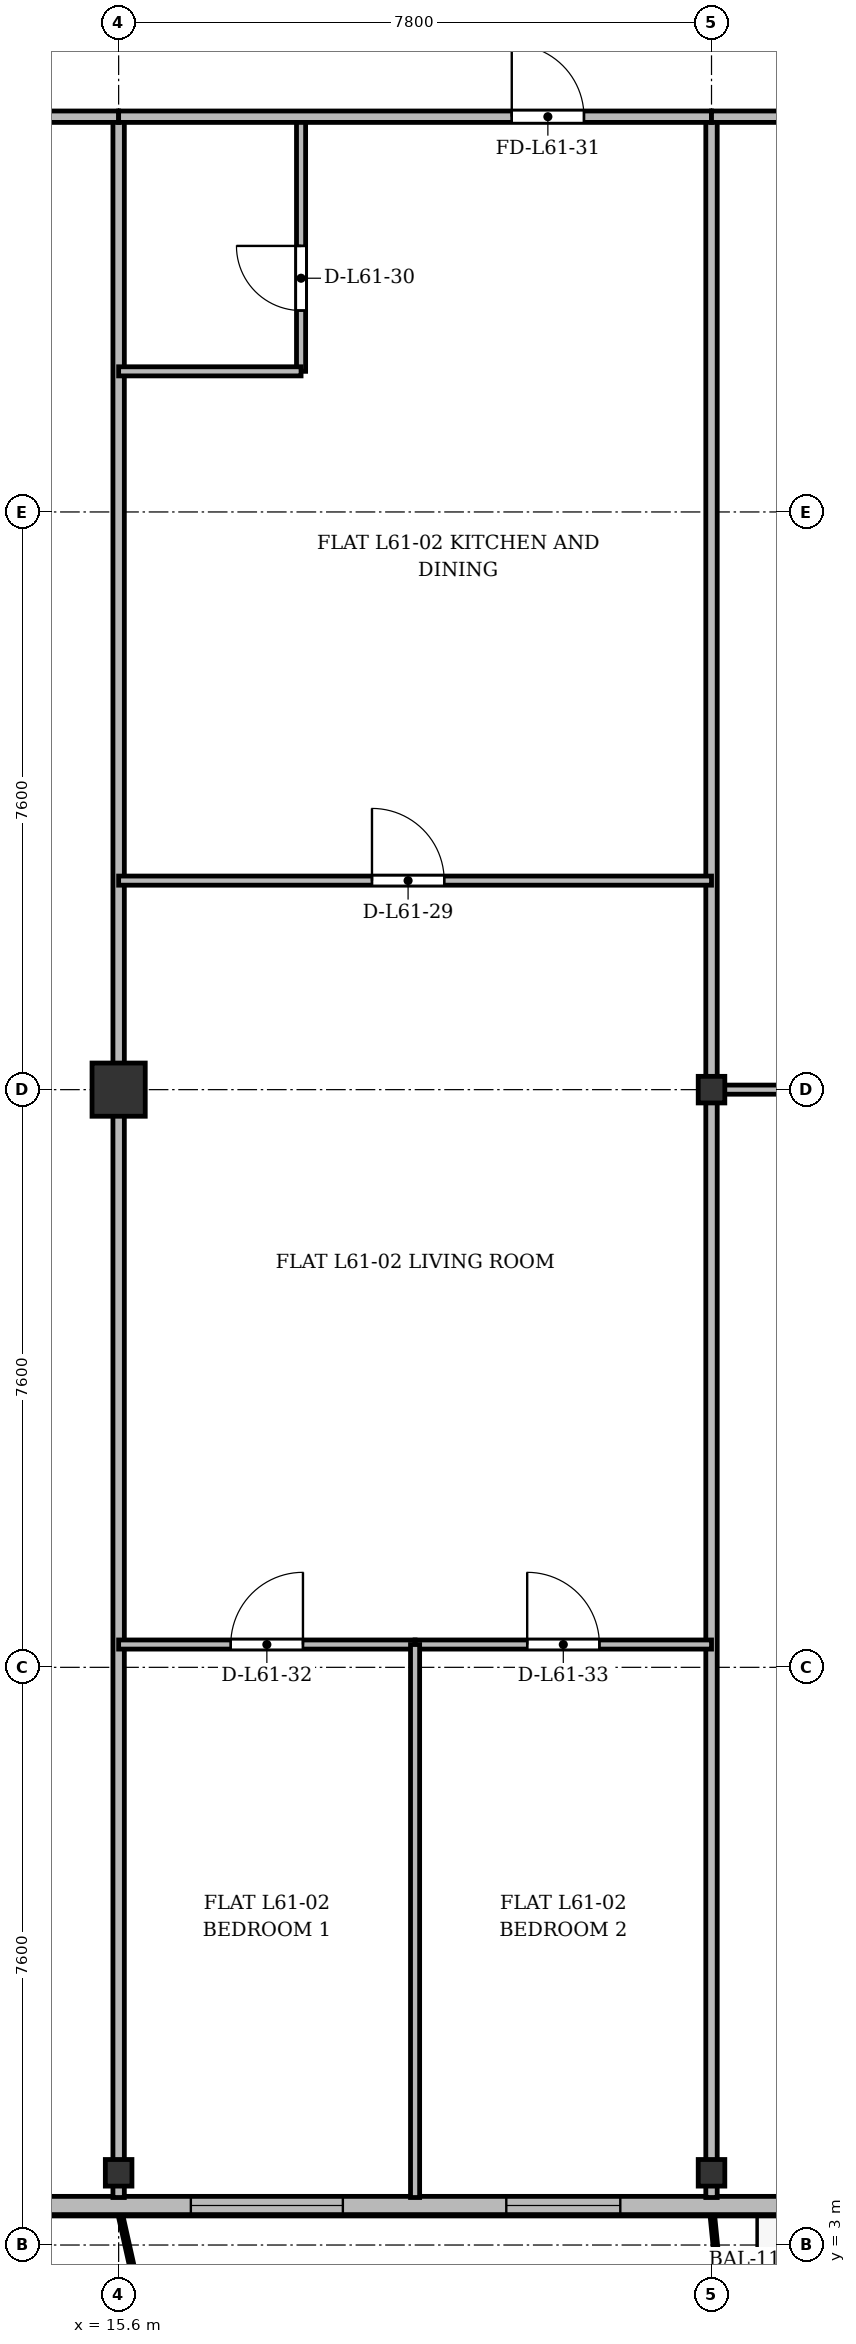
"""IFC4 building model, lengths in metres.
Left out: names, types, materials, properties, quantities, classifications, styles, units other than length and angle.
Written with IfcOpenShell. Run it as: python <this file> out.ifc"""

import sys

from ifc_helpers import new_model, si_unit, direction, frame, frame_2d, origin, origin_2d, place, context, subcontext, project, spatial, rectangle, i_section, extrude, source, transform, mapped, element, fill, save


model = new_model("IFC4")
c1 = context("Model", 3, precision=1e-05, world=origin(), true_north=direction((0.0, 1.0)))
c2 = subcontext(c1, "Body", "Model", "MODEL_VIEW")
j1 = project(units=[si_unit("LENGTHUNIT", "METRE"), si_unit("PLANEANGLEUNIT", "RADIAN")], contexts=[c1])
p1 = place(None, origin())
s1 = spatial("IfcSite", under=j1, at=p1, CompositionType="ELEMENT")
p2 = place(p1, origin())
s2 = spatial("IfcBuilding", under=s1, at=p2, CompositionType="ELEMENT")
p3 = place(p2, frame((0.0, 0.0, 233.7)))
s3 = spatial("IfcBuildingStorey", under=s2, at=p3, CompositionType="ELEMENT", Elevation=233.7)
m1 = source(origin(), c2, "Body", "SweptSolid", [
    extrude(i_section(OverallWidth=0.35, OverallDepth=0.35, WebThickness=0.018, FlangeThickness=0.028, at=origin_2d()), origin(), (0.0, 0.0, 1.0), 3.6),
])
p4 = place(p3, frame((15.6, 3.95, 0.0), z_axis=(0.0, 0.0, 1.0), x_axis=(1.0, 0.0, 0.0)))
e1 = element("IfcColumn", 1, at=p4, inside=s3, PredefinedType="COLUMN", context=c2, shape_type="MappedRepresentation", body=[
    mapped(m1, transform((0.0, 0.0, 0.0), x_axis=(1.0, 0.0, 0.0), y_axis=(0.0, 1.0, 0.0), z_axis=(0.0, 0.0, 1.0), scale=1.0)),
])
m2 = source(origin(), c2, "Body", "SweptSolid", [
    extrude(rectangle(XDim=0.7, YDim=0.7, at=origin_2d()), origin(), (0.0, 0.0, 1.0), 3.6),
])
p5 = place(p3, frame((15.6, 18.2, 0.0), z_axis=(0.0, 0.0, 1.0), x_axis=(1.0, 0.0, 0.0)))
e2 = element("IfcColumn", 2, at=p5, inside=s3, PredefinedType="COLUMN", context=c2, shape_type="MappedRepresentation", body=[
    mapped(m2, transform((0.0, 0.0, 0.0), x_axis=(1.0, 0.0, 0.0), y_axis=(0.0, 1.0, 0.0), z_axis=(0.0, 0.0, 1.0), scale=1.0)),
])
for number, where, z_axis, x_axis in (
    (3, (23.4, 3.95, 0.0), (0.0, 0.0, 1.0), (1.0, 0.0, 0.0)),
    (4, (23.4, 18.2, 0.0), (0.0, 0.0, 1.0), (1.0, 0.0, 0.0)),
):
    element("IfcColumn", number, at=place(p3, frame(where, z_axis=z_axis, x_axis=x_axis)), inside=s3, PredefinedType="COLUMN", context=c2, shape_type="MappedRepresentation", body=[
        mapped(m1, transform((0.0, 0.0, 0.0), x_axis=(1.0, 0.0, 0.0), y_axis=(0.0, 1.0, 0.0), z_axis=(0.0, 0.0, 1.0), scale=1.0)),
    ])
p6 = place(p3, frame((44.8, 3.52, 0.0), z_axis=(0.0, 0.0, 1.0), x_axis=(-1.0, 0.0, 0.0)))
e5 = element("IfcWall", 5, at=p6, inside=s3, PredefinedType="SOLIDWALL", context=c2, shape_type="SweptSolid", body=[
    extrude(rectangle(XDim=33.8, YDim=0.24, at=frame_2d((16.9, 0.0))), origin(), (0.0, 0.0, 1.0), 3.36),
])
p7 = place(p6, frame((2.55, 0.0, 0.9)))
e6 = element("IfcOpeningElement", 6, at=p7, cuts=e5, PredefinedType="OPENING", context=c2, shape_type="SweptSolid", body=[
    extrude(rectangle(XDim=1.5, YDim=1.75, at=frame_2d((0.75, 0.875))), frame((0.0, 0.13, 0.0), z_axis=(0.0, -1.0, 0.0), x_axis=(1.0, 0.0, 0.0)), (0.0, 0.0, 1.0), 0.26),
])
p8 = place(p6, frame((6.034, 0.0, 0.9)))
e7 = element("IfcOpeningElement", 7, at=p8, cuts=e5, PredefinedType="OPENING", context=c2, shape_type="SweptSolid", body=[
    extrude(rectangle(XDim=2.0, YDim=1.95, at=frame_2d((1.0, 0.975))), frame((0.0, 0.13, 0.0), z_axis=(0.0, -1.0, 0.0), x_axis=(1.0, 0.0, 0.0)), (0.0, 0.0, 1.0), 0.26),
])
p9 = place(p6, frame((9.075, 0.0, 0.9)))
e8 = element("IfcOpeningElement", 8, at=p9, cuts=e5, PredefinedType="OPENING", context=c2, shape_type="SweptSolid", body=[
    extrude(rectangle(XDim=1.65, YDim=1.85, at=frame_2d((0.825, 0.925))), frame((0.0, 0.13, 0.0), z_axis=(0.0, -1.0, 0.0), x_axis=(1.0, 0.0, 0.0)), (0.0, 0.0, 1.0), 0.26),
])
p10 = place(p6, frame((11.867, 0.0, 0.9)))
e9 = element("IfcOpeningElement", 9, at=p10, cuts=e5, PredefinedType="OPENING", context=c2, shape_type="SweptSolid", body=[
    extrude(rectangle(XDim=1.8, YDim=1.8, at=frame_2d((0.9, 0.9))), frame((0.0, 0.13, 0.0), z_axis=(0.0, -1.0, 0.0), x_axis=(1.0, 0.0, 0.0)), (0.0, 0.0, 1.0), 0.26),
])
p11 = place(p6, frame((17.291, 0.0, 0.0)))
e10 = element("IfcOpeningElement", 10, at=p11, cuts=e5, PredefinedType="OPENING", context=c2, shape_type="SweptSolid", body=[
    extrude(rectangle(XDim=1.2, YDim=2.2, at=frame_2d((0.6, 1.1))), frame((0.0, 0.13, 0.0), z_axis=(0.0, -1.0, 0.0), x_axis=(1.0, 0.0, 0.0)), (0.0, 0.0, 1.0), 0.26),
])
p12 = place(p6, frame((22.6, 0.0, 0.9)))
e11 = element("IfcOpeningElement", 11, at=p12, cuts=e5, PredefinedType="OPENING", context=c2, shape_type="SweptSolid", body=[
    extrude(rectangle(XDim=1.5, YDim=1.75, at=frame_2d((0.75, 0.875))), frame((0.0, 0.13, 0.0), z_axis=(0.0, -1.0, 0.0), x_axis=(1.0, 0.0, 0.0)), (0.0, 0.0, 1.0), 0.26),
])
p13 = place(p6, frame((26.25, 0.0, 0.9)))
e12 = element("IfcOpeningElement", 12, at=p13, cuts=e5, PredefinedType="OPENING", context=c2, shape_type="SweptSolid", body=[
    extrude(rectangle(XDim=2.0, YDim=1.95, at=frame_2d((1.0, 0.975))), frame((0.0, 0.13, 0.0), z_axis=(0.0, -1.0, 0.0), x_axis=(1.0, 0.0, 0.0)), (0.0, 0.0, 1.0), 0.26),
])
p14 = place(p6, frame((30.63, 0.0, 0.9)))
e13 = element("IfcOpeningElement", 13, at=p14, cuts=e5, PredefinedType="OPENING", context=c2, shape_type="SweptSolid", body=[
    extrude(rectangle(XDim=1.65, YDim=1.85, at=frame_2d((0.825, 0.925))), frame((0.0, 0.13, 0.0), z_axis=(0.0, -1.0, 0.0), x_axis=(1.0, 0.0, 0.0)), (0.0, 0.0, 1.0), 0.26),
])
for number, where, z_axis, x_axis in (
    (14, (15.6, 3.625, 0.0), (0.0, 0.0, 1.0), (0.0, 1.0, 0.0)),
    (15, (23.4, 3.625, 0.0), (0.0, 0.0, 1.0), (0.0, 1.0, 0.0)),
):
    element("IfcWall", number, at=place(p3, frame(where, z_axis=z_axis, x_axis=x_axis)), inside=s3, PredefinedType="PARTITIONING", context=c2, shape_type="SweptSolid", body=[
        extrude(rectangle(XDim=27.375, YDim=0.15, at=frame_2d((13.688, 0.0))), origin(), (0.0, 0.0, 1.0), 2.86),
    ])
p15 = place(p3, frame((8.225, 31.0, 0.0), z_axis=(0.0, 0.0, 1.0), x_axis=(1.0, 0.0, 0.0)))
e16 = element("IfcWall", 16, at=p15, inside=s3, PredefinedType="PARTITIONING", context=c2, shape_type="SweptSolid", body=[
    extrude(rectangle(XDim=7.375, YDim=0.15, at=frame_2d((3.688, 0.0))), origin(), (0.0, 0.0, 1.0), 2.86),
])
p16 = place(p15, frame((2.795, 0.0, 0.0)))
e17 = element("IfcOpeningElement", 17, at=p16, cuts=e16, PredefinedType="OPENING", context=c2, shape_type="SweptSolid", body=[
    extrude(rectangle(XDim=1.6, YDim=2.2, at=frame_2d((0.8, 1.1))), frame((0.0, 0.085, 0.0), z_axis=(0.0, -1.0, 0.0), x_axis=(1.0, 0.0, 0.0)), (0.0, 0.0, 1.0), 0.17),
])
p17 = place(p3, frame((15.6, 20.95, 0.0), z_axis=(0.0, 0.0, 1.0), x_axis=(1.0, 0.0, 0.0)))
e18 = element("IfcWall", 18, at=p17, inside=s3, PredefinedType="PARTITIONING", context=c2, shape_type="SweptSolid", body=[
    extrude(rectangle(XDim=7.8, YDim=0.12, at=frame_2d((3.9, 0.0))), origin(), (0.0, 0.0, 1.0), 2.86),
])
p18 = place(p17, frame((3.333, 0.0, 0.0)))
e19 = element("IfcOpeningElement", 19, at=p18, cuts=e18, PredefinedType="OPENING", context=c2, shape_type="SweptSolid", body=[
    extrude(rectangle(XDim=0.95, YDim=2.15, at=frame_2d((0.475, 1.075))), frame((0.0, 0.07, 0.0), z_axis=(0.0, -1.0, 0.0), x_axis=(1.0, 0.0, 0.0)), (0.0, 0.0, 1.0), 0.14),
])
p19 = place(p3, frame((18.0, 27.65, 0.0), z_axis=(0.0, 0.0, 1.0), x_axis=(0.0, 1.0, 0.0)))
e20 = element("IfcWall", 20, at=p19, inside=s3, PredefinedType="PARTITIONING", context=c2, shape_type="SweptSolid", body=[
    extrude(rectangle(XDim=3.35, YDim=0.12, at=frame_2d((1.675, 0.0))), origin(), (0.0, 0.0, 1.0), 3.36),
])
p20 = place(p19, frame((0.8, 0.0, 0.0)))
e21 = element("IfcOpeningElement", 21, at=p20, cuts=e20, PredefinedType="OPENING", context=c2, shape_type="SweptSolid", body=[
    extrude(rectangle(XDim=0.85, YDim=2.1, at=frame_2d((0.425, 1.05))), frame((0.0, 0.07, 0.0), z_axis=(0.0, -1.0, 0.0), x_axis=(1.0, 0.0, 0.0)), (0.0, 0.0, 1.0), 0.14),
])
p21 = place(p3, frame((15.6, 27.65, 0.0), z_axis=(0.0, 0.0, 1.0), x_axis=(1.0, 0.0, 0.0)))
e22 = element("IfcWall", 22, at=p21, inside=s3, PredefinedType="PARTITIONING", context=c2, shape_type="SweptSolid", body=[
    extrude(rectangle(XDim=2.4, YDim=0.12, at=frame_2d((1.2, 0.0))), origin(), (0.0, 0.0, 1.0), 2.86),
])
p22 = place(p3, frame((15.6, 31.0, 0.0), z_axis=(0.0, 0.0, 1.0), x_axis=(1.0, 0.0, 0.0)))
e23 = element("IfcWall", 23, at=p22, inside=s3, PredefinedType="PARTITIONING", context=c2, shape_type="SweptSolid", body=[
    extrude(rectangle(XDim=7.8, YDim=0.15, at=frame_2d((3.9, 0.0))), origin(), (0.0, 0.0, 1.0), 2.86),
])
p23 = place(p22, frame((5.172, 0.0, 0.0)))
e24 = element("IfcOpeningElement", 24, at=p23, cuts=e23, PredefinedType="OPENING", context=c2, shape_type="SweptSolid", body=[
    extrude(rectangle(XDim=0.95, YDim=2.15, at=frame_2d((0.475, 1.075))), frame((0.0, 0.085, 0.0), z_axis=(0.0, -1.0, 0.0), x_axis=(1.0, 0.0, 0.0)), (0.0, 0.0, 1.0), 0.17),
])
p24 = place(p3, frame((15.6, 10.9, 0.0), z_axis=(0.0, 0.0, 1.0), x_axis=(1.0, 0.0, 0.0)))
e25 = element("IfcWall", 25, at=p24, inside=s3, PredefinedType="PARTITIONING", context=c2, shape_type="SweptSolid", body=[
    extrude(rectangle(XDim=3.9, YDim=0.12, at=frame_2d((1.95, 0.0))), origin(), (0.0, 0.0, 1.0), 2.86),
])
p25 = place(p24, frame((1.475, 0.0, 0.0)))
e26 = element("IfcOpeningElement", 26, at=p25, cuts=e25, PredefinedType="OPENING", context=c2, shape_type="SweptSolid", body=[
    extrude(rectangle(XDim=0.95, YDim=2.15, at=frame_2d((0.475, 1.075))), frame((0.0, 0.07, 0.0), z_axis=(0.0, -1.0, 0.0), x_axis=(1.0, 0.0, 0.0)), (0.0, 0.0, 1.0), 0.14),
])
p26 = place(p3, frame((19.5, 10.9, 0.0), z_axis=(0.0, 0.0, 1.0), x_axis=(1.0, 0.0, 0.0)))
e27 = element("IfcWall", 27, at=p26, inside=s3, PredefinedType="PARTITIONING", context=c2, shape_type="SweptSolid", body=[
    extrude(rectangle(XDim=3.9, YDim=0.12, at=frame_2d((1.95, 0.0))), origin(), (0.0, 0.0, 1.0), 2.86),
])
p27 = place(p26, frame((1.475, 0.0, 0.0)))
e28 = element("IfcOpeningElement", 28, at=p27, cuts=e27, PredefinedType="OPENING", context=c2, shape_type="SweptSolid", body=[
    extrude(rectangle(XDim=0.95, YDim=2.15, at=frame_2d((0.475, 1.075))), frame((0.0, 0.07, 0.0), z_axis=(0.0, -1.0, 0.0), x_axis=(1.0, 0.0, 0.0)), (0.0, 0.0, 1.0), 0.14),
])
p28 = place(p3, frame((19.5, 3.625, 0.0), z_axis=(0.0, 0.0, 1.0), x_axis=(0.0, 1.0, 0.0)))
e29 = element("IfcWall", 29, at=p28, inside=s3, PredefinedType="PARTITIONING", context=c2, shape_type="SweptSolid", body=[
    extrude(rectangle(XDim=7.275, YDim=0.12, at=frame_2d((3.637, 0.0))), origin(), (0.0, 0.0, 1.0), 2.91),
])
p29 = place(p3, frame((23.4, 31.0, 0.0), z_axis=(0.0, 0.0, 1.0), x_axis=(1.0, 0.0, 0.0)))
e30 = element("IfcWall", 30, at=p29, inside=s3, PredefinedType="PARTITIONING", context=c2, shape_type="SweptSolid", body=[
    extrude(rectangle(XDim=7.2, YDim=0.15, at=frame_2d((3.6, 0.0))), origin(), (0.0, 0.0, 1.0), 2.86),
])
p30 = place(p29, frame((3.125, 0.0, 0.0)))
e31 = element("IfcOpeningElement", 31, at=p30, cuts=e30, PredefinedType="OPENING", context=c2, shape_type="SweptSolid", body=[
    extrude(rectangle(XDim=0.95, YDim=2.15, at=frame_2d((0.475, 1.075))), frame((0.0, 0.085, 0.0), z_axis=(0.0, -1.0, 0.0), x_axis=(1.0, 0.0, 0.0)), (0.0, 0.0, 1.0), 0.17),
])
p31 = place(p3, frame((23.4, 18.2, 0.0), z_axis=(0.0, 0.0, 1.0), x_axis=(1.0, 0.0, 0.0)))
e32 = element("IfcWall", 32, at=p31, inside=s3, PredefinedType="PARTITIONING", context=c2, shape_type="SweptSolid", body=[
    extrude(rectangle(XDim=7.2, YDim=0.12, at=frame_2d((3.6, 0.0))), origin(), (0.0, 0.0, 1.0), 2.91),
])
p32 = place(p31, frame((3.125, 0.0, 0.0)))
e33 = element("IfcOpeningElement", 33, at=p32, cuts=e32, PredefinedType="OPENING", context=c2, shape_type="SweptSolid", body=[
    extrude(rectangle(XDim=0.95, YDim=2.15, at=frame_2d((0.475, 1.075))), frame((0.0, 0.07, 0.0), z_axis=(0.0, -1.0, 0.0), x_axis=(1.0, 0.0, 0.0)), (0.0, 0.0, 1.0), 0.14),
])
m3 = source(origin(), c2, "Body", "SweptSolid", [
    extrude(rectangle(XDim=1.5, YDim=1.75, at=frame_2d((0.75, 0.875))), frame((0.0, 0.03, 0.0), z_axis=(0.0, -1.0, 0.0), x_axis=(1.0, 0.0, 0.0)), (0.0, 0.0, 1.0), 0.06),
])
p33 = place(p12, origin())
e34 = element("IfcWindow", 34, at=p33, inside=s3, PartitioningType="SINGLE_PANEL", PredefinedType="WINDOW", context=c2, shape_type="MappedRepresentation", body=[
    mapped(m3, transform((0.0, 0.0, 0.0), x_axis=(1.0, 0.0, 0.0), y_axis=(0.0, 1.0, 0.0), z_axis=(0.0, 0.0, 1.0), scale=1.0)),
])
fill(e11, e34)
m4 = source(origin(), c2, "Body", "SweptSolid", [
    extrude(rectangle(XDim=2.0, YDim=1.95, at=frame_2d((1.0, 0.975))), frame((0.0, 0.03, 0.0), z_axis=(0.0, -1.0, 0.0), x_axis=(1.0, 0.0, 0.0)), (0.0, 0.0, 1.0), 0.06),
])
p34 = place(p13, origin())
e35 = element("IfcWindow", 35, at=p34, inside=s3, PartitioningType="SINGLE_PANEL", PredefinedType="WINDOW", context=c2, shape_type="MappedRepresentation", body=[
    mapped(m4, transform((0.0, 0.0, 0.0), x_axis=(1.0, 0.0, 0.0), y_axis=(0.0, 1.0, 0.0), z_axis=(0.0, 0.0, 1.0), scale=1.0)),
])
fill(e12, e35)
m5 = source(origin(), c2, "Body", "SweptSolid", [
    extrude(rectangle(XDim=0.95, YDim=2.15, at=frame_2d((0.475, 1.075))), frame((0.0, 0.025, 0.0), z_axis=(0.0, -1.0, 0.0), x_axis=(1.0, 0.0, 0.0)), (0.0, 0.0, 1.0), 0.05),
])
p35 = place(p18, origin())
e36 = element("IfcDoor", 36, at=p35, inside=s3, OperationType="SINGLE_SWING_LEFT", PredefinedType="DOOR", context=c2, shape_type="MappedRepresentation", body=[
    mapped(m5, transform((0.0, 0.0, 0.0), x_axis=(1.0, 0.0, 0.0), y_axis=(0.0, 1.0, 0.0), z_axis=(0.0, 0.0, 1.0), scale=1.0)),
])
fill(e19, e36)
m6 = source(origin(), c2, "Body", "SweptSolid", [
    extrude(rectangle(XDim=0.85, YDim=2.1, at=frame_2d((0.425, 1.05))), frame((0.0, 0.025, 0.0), z_axis=(0.0, -1.0, 0.0), x_axis=(1.0, 0.0, 0.0)), (0.0, 0.0, 1.0), 0.05),
])
p36 = place(p20, origin())
e37 = element("IfcDoor", 37, at=p36, inside=s3, OperationType="SINGLE_SWING_RIGHT", PredefinedType="DOOR", context=c2, shape_type="MappedRepresentation", body=[
    mapped(m6, transform((0.0, 0.0, 0.0), x_axis=(1.0, 0.0, 0.0), y_axis=(0.0, 1.0, 0.0), z_axis=(0.0, 0.0, 1.0), scale=1.0)),
])
fill(e21, e37)
p37 = place(p23, origin())
e38 = element("IfcDoor", 38, at=p37, inside=s3, OperationType="SINGLE_SWING_LEFT", PredefinedType="DOOR", context=c2, shape_type="MappedRepresentation", body=[
    mapped(m5, transform((0.0, 0.0, 0.0), x_axis=(1.0, 0.0, 0.0), y_axis=(0.0, 1.0, 0.0), z_axis=(0.0, 0.0, 1.0), scale=1.0)),
])
fill(e24, e38)
p38 = place(p25, origin())
e39 = element("IfcDoor", 39, at=p38, inside=s3, OperationType="SINGLE_SWING_RIGHT", PredefinedType="DOOR", context=c2, shape_type="MappedRepresentation", body=[
    mapped(m5, transform((0.0, 0.0, 0.0), x_axis=(1.0, 0.0, 0.0), y_axis=(0.0, 1.0, 0.0), z_axis=(0.0, 0.0, 1.0), scale=1.0)),
])
fill(e26, e39)
p39 = place(p27, origin())
e40 = element("IfcDoor", 40, at=p39, inside=s3, OperationType="SINGLE_SWING_LEFT", PredefinedType="DOOR", context=c2, shape_type="MappedRepresentation", body=[
    mapped(m5, transform((0.0, 0.0, 0.0), x_axis=(1.0, 0.0, 0.0), y_axis=(0.0, 1.0, 0.0), z_axis=(0.0, 0.0, 1.0), scale=1.0)),
])
fill(e28, e40)
save(model, sys.argv[1])
